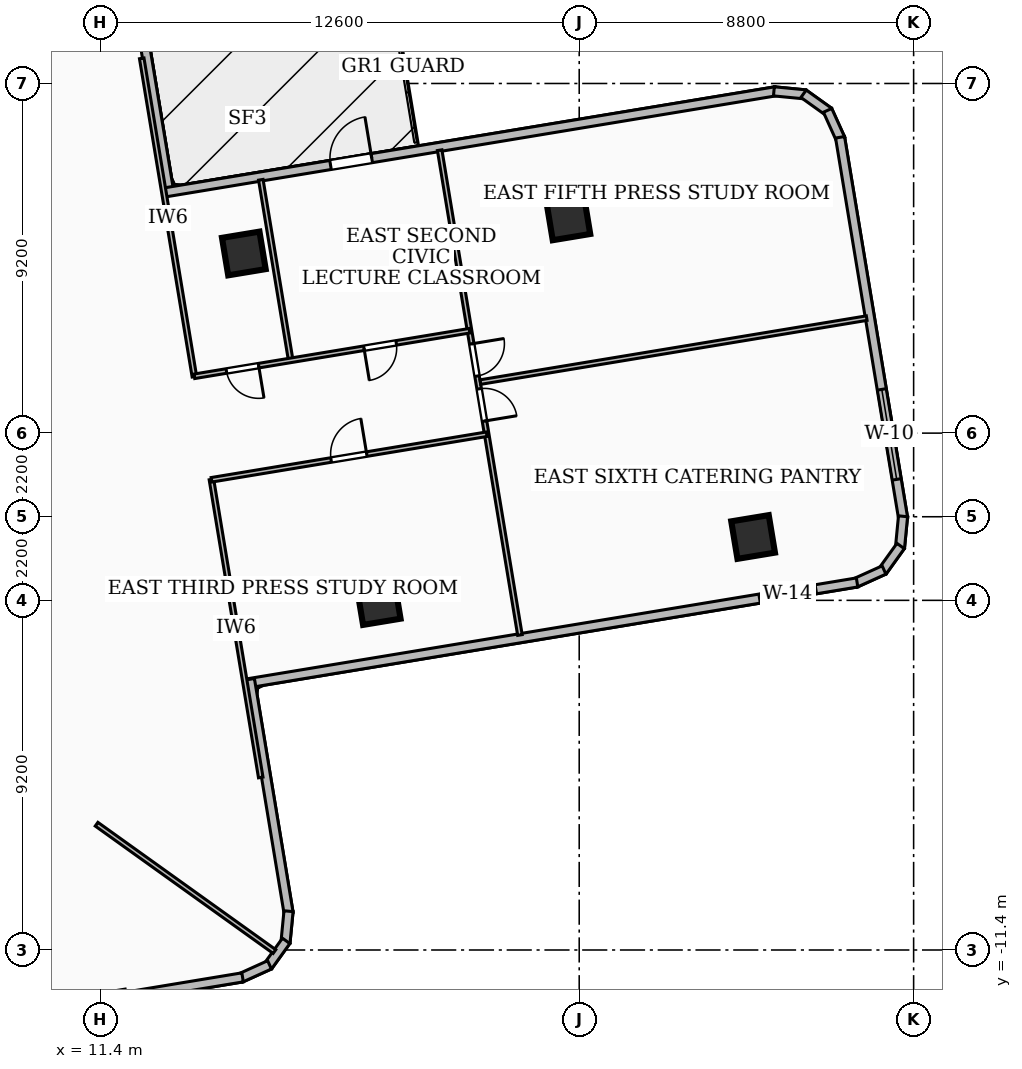
"""IFC4 building model, lengths in metres.
Left out: names, types, materials, properties, quantities, classifications, styles, units other than length and angle.
Written with IfcOpenShell. Run it as: python <this file> out.ifc"""

import sys

from ifc_helpers import new_model, si_unit, direction, frame, frame_2d, origin, origin_2d, place, context, subcontext, project, spatial, rectangle, extrude, element, fill, save


model = new_model("IFC4")
c1 = context("Model", 3, precision=1e-05, world=origin(), true_north=direction((0.0, 1.0)))
c2 = subcontext(c1, "Body", "Model", "MODEL_VIEW")
j1 = project(units=[si_unit("LENGTHUNIT", "METRE"), si_unit("PLANEANGLEUNIT", "RADIAN")], contexts=[c1])
p1 = place(None, origin())
s1 = spatial("IfcSite", under=j1, at=p1, CompositionType="ELEMENT")
p2 = place(p1, origin())
s2 = spatial("IfcBuilding", under=s1, at=p2, CompositionType="ELEMENT")
p3 = place(p2, frame((0.0, 0.0, 92.88)))
s3 = spatial("IfcBuildingStorey", under=s2, at=p3, CompositionType="ELEMENT", Elevation=92.88)
for number, where, z_axis, x_axis in (
    (1, (18.724, -2.271, 0.0), (0.0, 0.0, 1.0), (0.987, 0.163, 0.0)),
    (2, (15.175, 6.927, 0.0), (0.0, 0.0, 1.0), (0.987, 0.163, 0.0)),
    (3, (28.576, -0.533, 0.0), (0.0, 0.0, 1.0), (0.987, 0.163, 0.0)),
    (4, (23.715, 7.851, 0.0), (0.0, 0.0, 1.0), (0.987, 0.163, 0.0)),
):
    element("IfcColumn", number, at=place(p3, frame(where, z_axis=z_axis, x_axis=x_axis)), inside=s3, PredefinedType="COLUMN", context=c2, shape_type="SweptSolid", body=[
        extrude(rectangle(XDim=1.0, YDim=1.0, at=origin_2d()), origin(), (0.0, 0.0, 1.0), 3.6),
    ])
p4 = place(p3, frame((12.12, 15.142, 0.0), z_axis=(0.0, 0.0, 1.0), x_axis=(0.163241835244, -0.986586085056, 0.0)))
e5 = element("IfcWall", 5, at=p4, inside=s3, PredefinedType="SOLIDWALL", context=c2, shape_type="SweptSolid", body=[
    extrude(rectangle(XDim=6.775, YDim=0.24, at=frame_2d((3.387, 0.0))), origin(), (0.0, 0.0, 1.0), 2.644),
])
p5 = place(p3, frame((13.115, 8.537, 0.0), z_axis=(0.0, 0.0, 1.0), x_axis=(0.986576548161, 0.163299463007, 0.0)))
e6 = element("IfcWall", 6, at=p5, inside=s3, PredefinedType="SOLIDWALL", context=c2, shape_type="SweptSolid", body=[
    extrude(rectangle(XDim=16.277, YDim=0.24, at=frame_2d((8.138, 0.0))), origin(), (0.0, 0.0, 1.0), 2.644),
])
p6 = place(p5, frame((4.4, 0.0, 0.0)))
e7 = element("IfcOpeningElement", 7, at=p6, cuts=e6, PredefinedType="OPENING", context=c2, shape_type="SweptSolid", body=[
    extrude(rectangle(XDim=1.1, YDim=2.1, at=frame_2d((0.55, 1.05))), frame((0.0, 0.13, 0.0), z_axis=(0.0, -1.0, 0.0), x_axis=(1.0, 0.0, 0.0)), (0.0, 0.0, 1.0), 0.26),
])
p7 = place(p3, frame((29.123, 11.193, 0.0), z_axis=(0.0, 0.0, 1.0), x_axis=(0.995332708541, -0.096502846113, 0.0)))
e8 = element("IfcWall", 8, at=p7, inside=s3, PredefinedType="SOLIDWALL", context=c2, shape_type="SweptSolid", body=[
    extrude(rectangle(XDim=0.83, YDim=0.24, at=frame_2d((0.415, 0.0))), origin(), (0.0, 0.0, 1.0), 3.34),
])
p8 = place(p3, frame((29.904, 11.13, 0.0), z_axis=(0.0, 0.0, 1.0), x_axis=(0.812516648433, -0.582937986427, 0.0)))
e9 = element("IfcWall", 9, at=p8, inside=s3, PredefinedType="SOLIDWALL", context=c2, shape_type="SweptSolid", body=[
    extrude(rectangle(XDim=0.815, YDim=0.24, at=frame_2d((0.407, 0.0))), origin(), (0.0, 0.0, 1.0), 3.34),
])
p9 = place(p3, frame((30.536, 10.693, 0.0), z_axis=(0.0, 0.0, 1.0), x_axis=(0.411720575173, -0.911310138196, 0.0)))
e10 = element("IfcWall", 10, at=p9, inside=s3, PredefinedType="SOLIDWALL", context=c2, shape_type="SweptSolid", body=[
    extrude(rectangle(XDim=0.831, YDim=0.24, at=frame_2d((0.416, 0.0))), origin(), (0.0, 0.0, 1.0), 3.34),
])
p10 = place(p3, frame((30.864, 9.984, 0.0), z_axis=(0.0, 0.0, 1.0), x_axis=(0.163307635867, -0.986575195344, 0.0)))
e11 = element("IfcWall", 11, at=p10, inside=s3, PredefinedType="SOLIDWALL", context=c2, shape_type="SweptSolid", body=[
    extrude(rectangle(XDim=10.158, YDim=0.24, at=frame_2d((5.079, 0.0))), origin(), (0.0, 0.0, 1.0), 3.34),
])
p11 = place(p10, frame((6.724, 0.0, 0.85)))
e12 = element("IfcOpeningElement", 12, at=p11, cuts=e11, PredefinedType="OPENING", context=c2, shape_type="SweptSolid", body=[
    extrude(rectangle(XDim=2.4, YDim=1.65, at=frame_2d((1.2, 0.825))), frame((0.0, 0.13, 0.0), z_axis=(0.0, -1.0, 0.0), x_axis=(1.0, 0.0, 0.0)), (0.0, 0.0, 1.0), 0.26),
])
p12 = place(p3, frame((32.521, 0.012, 0.0), z_axis=(0.0, 0.0, 1.0), x_axis=(-0.096389937095, -0.995343649212, 0.0)))
e13 = element("IfcWall", 13, at=p12, inside=s3, PredefinedType="SOLIDWALL", context=c2, shape_type="SweptSolid", body=[
    extrude(rectangle(XDim=0.831, YDim=0.24, at=frame_2d((0.416, 0.0))), origin(), (0.0, 0.0, 1.0), 3.34),
])
p13 = place(p3, frame((32.458, -0.77, 0.0), z_axis=(0.0, 0.0, 1.0), x_axis=(-0.583704032354, -0.811966503382, 0.0)))
e14 = element("IfcWall", 14, at=p13, inside=s3, PredefinedType="SOLIDWALL", context=c2, shape_type="SweptSolid", body=[
    extrude(rectangle(XDim=0.814, YDim=0.24, at=frame_2d((0.407, 0.0))), origin(), (0.0, 0.0, 1.0), 3.34),
])
p14 = place(p3, frame((32.021, -1.401, 0.0), z_axis=(0.0, 0.0, 1.0), x_axis=(-0.911310138196, -0.411720575173, 0.0)))
e15 = element("IfcWall", 15, at=p14, inside=s3, PredefinedType="SOLIDWALL", context=c2, shape_type="SweptSolid", body=[
    extrude(rectangle(XDim=0.831, YDim=0.24, at=frame_2d((0.416, 0.0))), origin(), (0.0, 0.0, 1.0), 3.34),
])
p15 = place(p3, frame((31.312, -1.729, 0.0), z_axis=(0.0, 0.0, 1.0), x_axis=(-0.986572947557, -0.163321214629, 0.0)))
e16 = element("IfcWall", 16, at=p15, inside=s3, PredefinedType="SOLIDWALL", context=c2, shape_type="SweptSolid", body=[
    extrude(rectangle(XDim=16.274, YDim=0.24, at=frame_2d((8.137, 0.0))), origin(), (0.0, 0.0, 1.0), 3.34),
])
p16 = place(p15, frame((1.1, 0.0, 0.85)))
e17 = element("IfcOpeningElement", 17, at=p16, cuts=e16, PredefinedType="OPENING", context=c2, shape_type="SweptSolid", body=[
    extrude(rectangle(XDim=1.5, YDim=1.5, at=frame_2d((0.75, 0.75))), frame((0.0, 0.13, 0.0), z_axis=(0.0, -1.0, 0.0), x_axis=(1.0, 0.0, 0.0)), (0.0, 0.0, 1.0), 0.26),
])
p17 = place(p3, frame((15.335, -4.276, 0.0), z_axis=(0.0, 0.0, 1.0), x_axis=(0.16323720082, -0.986586851863, 0.0)))
e18 = element("IfcWall", 18, at=p17, inside=s3, PredefinedType="SOLIDWALL", context=c2, shape_type="SweptSolid", body=[
    extrude(rectangle(XDim=6.237, YDim=0.24, at=frame_2d((3.118, 0.0))), origin(), (0.0, 0.0, 1.0), 3.34),
])
p18 = place(p3, frame((16.351, -10.379, 0.0), z_axis=(0.0, 0.0, 1.0), x_axis=(-0.096474594184, -0.995335447313, 0.0)))
e19 = element("IfcWall", 19, at=p18, inside=s3, PredefinedType="SOLIDWALL", context=c2, shape_type="SweptSolid", body=[
    extrude(rectangle(XDim=0.83, YDim=0.24, at=frame_2d((0.415, 0.0))), origin(), (0.0, 0.0, 1.0), 3.34),
])
p19 = place(p3, frame((16.288, -11.16, 0.0), z_axis=(0.0, 0.0, 1.0), x_axis=(-0.583561896965, -0.812068662375, 0.0)))
e20 = element("IfcWall", 20, at=p19, inside=s3, PredefinedType="SOLIDWALL", context=c2, shape_type="SweptSolid", body=[
    extrude(rectangle(XDim=0.814, YDim=0.24, at=frame_2d((0.407, 0.0))), origin(), (0.0, 0.0, 1.0), 3.34),
])
p20 = place(p3, frame((15.851, -11.791, 0.0), z_axis=(0.0, 0.0, 1.0), x_axis=(-0.910868773958, -0.412696106872, 0.0)))
e21 = element("IfcWall", 21, at=p20, inside=s3, PredefinedType="SOLIDWALL", context=c2, shape_type="SweptSolid", body=[
    extrude(rectangle(XDim=0.831, YDim=0.24, at=frame_2d((0.416, 0.0))), origin(), (0.0, 0.0, 1.0), 3.34),
])
p21 = place(p3, frame((15.142, -12.12, 0.0), z_axis=(0.0, 0.0, 1.0), x_axis=(-0.986586085056, -0.163241835244, 0.0)))
e22 = element("IfcWall", 22, at=p21, inside=s3, PredefinedType="SOLIDWALL", context=c2, shape_type="SweptSolid", body=[
    extrude(rectangle(XDim=6.775, YDim=0.24, at=frame_2d((3.387, 0.0))), origin(), (0.0, 0.0, 1.0), 3.34),
])
p22 = place(p3, frame((7.431, 10.38, 0.0), z_axis=(0.0, 0.0, 1.0), x_axis=(0.582126278944, 0.813098392178, 0.0)))
e23 = element("IfcWall", 23, at=p22, inside=s3, PredefinedType="PARTITIONING", context=c2, shape_type="SweptSolid", body=[
    extrude(rectangle(XDim=6.889, YDim=0.12, at=frame_2d((3.444, 0.0))), origin(), (0.0, 0.0, 1.0), 2.486),
])
p23 = place(p3, frame((11.3, -8.09, 0.0), z_axis=(0.0, 0.0, 1.0), x_axis=(0.813131268368, -0.582080355623, 0.0)))
e24 = element("IfcWall", 24, at=p23, inside=s3, PredefinedType="PARTITIONING", context=c2, shape_type="SweptSolid", body=[
    extrude(rectangle(XDim=5.757, YDim=0.12, at=frame_2d((2.878, 0.0))), origin(), (0.0, 0.0, 1.0), 3.34),
])
p24 = place(p3, frame((13.874, 3.686, 0.0), z_axis=(0.0, 0.0, 1.0), x_axis=(-0.163270245909, 0.98658138377, 0.0)))
e25 = element("IfcWall", 25, at=p24, inside=s3, PredefinedType="PARTITIONING", context=c2, shape_type="SweptSolid", body=[
    extrude(rectangle(XDim=8.489, YDim=0.12, at=frame_2d((4.245, 0.0))), origin(), (0.0, 0.0, 1.0), 2.486),
])
p25 = place(p3, frame((15.62, -6.86, 0.0), z_axis=(0.0, 0.0, 1.0), x_axis=(-0.16330811288, 0.986575116384, 0.0)))
e26 = element("IfcWall", 26, at=p25, inside=s3, PredefinedType="PARTITIONING", context=c2, shape_type="SweptSolid", body=[
    extrude(rectangle(XDim=7.949, YDim=0.12, at=frame_2d((3.974, 0.0))), origin(), (0.0, 0.0, 1.0), 2.486),
])
p26 = place(p3, frame((16.405, 4.135, 0.0), z_axis=(0.0, 0.0, 1.0), x_axis=(-0.163276056047, 0.986580422227, 0.0)))
e27 = element("IfcWall", 27, at=p26, inside=s3, PredefinedType="PARTITIONING", context=c2, shape_type="SweptSolid", body=[
    extrude(rectangle(XDim=4.795, YDim=0.12, at=frame_2d((2.398, 0.0))), origin(), (0.0, 0.0, 1.0), 2.486),
])
p27 = place(p3, frame((21.114, 4.894, 0.0), z_axis=(0.0, 0.0, 1.0), x_axis=(-0.986566884893, -0.163357833093, 0.0)))
e28 = element("IfcWall", 28, at=p27, inside=s3, PredefinedType="PARTITIONING", context=c2, shape_type="SweptSolid", body=[
    extrude(rectangle(XDim=7.34, YDim=0.12, at=frame_2d((3.67, 0.0))), origin(), (0.0, 0.0, 1.0), 3.34),
])
p28 = place(p27, frame((5.625, 0.0, 0.0)))
e29 = element("IfcOpeningElement", 29, at=p28, cuts=e28, PredefinedType="OPENING", context=c2, shape_type="SweptSolid", body=[
    extrude(rectangle(XDim=0.86, YDim=2.04, at=frame_2d((0.43, 1.02))), frame((0.0, 0.07, 0.0), z_axis=(0.0, -1.0, 0.0), x_axis=(1.0, 0.0, 0.0)), (0.0, 0.0, 1.0), 0.14),
])
p29 = place(p27, frame((1.955, 0.0, 0.0)))
e30 = element("IfcOpeningElement", 30, at=p29, cuts=e28, PredefinedType="OPENING", context=c2, shape_type="SweptSolid", body=[
    extrude(rectangle(XDim=0.86, YDim=2.04, at=frame_2d((0.43, 1.02))), frame((0.0, 0.07, 0.0), z_axis=(0.0, -1.0, 0.0), x_axis=(1.0, 0.0, 0.0)), (0.0, 0.0, 1.0), 0.14),
])
p30 = place(p3, frame((14.324, 0.972, 0.0), z_axis=(0.0, 0.0, 1.0), x_axis=(0.986566884893, 0.163357833093, 0.0)))
e31 = element("IfcWall", 31, at=p30, inside=s3, PredefinedType="PARTITIONING", context=c2, shape_type="SweptSolid", body=[
    extrude(rectangle(XDim=7.34, YDim=0.12, at=frame_2d((3.67, 0.0))), origin(), (0.0, 0.0, 1.0), 3.34),
])
p31 = place(p30, frame((3.19, 0.0, 0.0)))
e32 = element("IfcOpeningElement", 32, at=p31, cuts=e31, PredefinedType="OPENING", context=c2, shape_type="SweptSolid", body=[
    extrude(rectangle(XDim=0.95, YDim=2.08, at=frame_2d((0.475, 1.04))), frame((0.0, 0.07, 0.0), z_axis=(0.0, -1.0, 0.0), x_axis=(1.0, 0.0, 0.0)), (0.0, 0.0, 1.0), 0.14),
])
p32 = place(p3, frame((21.399, 3.543, 0.0), z_axis=(0.0, 0.0, 1.0), x_axis=(0.986570089658, 0.16333847738, 0.0)))
e33 = element("IfcWall", 33, at=p32, inside=s3, PredefinedType="PARTITIONING", context=c2, shape_type="SweptSolid", body=[
    extrude(rectangle(XDim=10.304, YDim=0.12, at=frame_2d((5.152, 0.0))), origin(), (0.0, 0.0, 1.0), 2.832),
])
p33 = place(p3, frame((20.328, 9.645, 0.0), z_axis=(0.0, 0.0, 1.0), x_axis=(0.163336472865, -0.986570421527, 0.0)))
e34 = element("IfcWall", 34, at=p33, inside=s3, PredefinedType="PARTITIONING", context=c2, shape_type="SweptSolid", body=[
    extrude(rectangle(XDim=12.931, YDim=0.12, at=frame_2d((6.465, 0.0))), origin(), (0.0, 0.0, 1.0), 2.486),
])
p34 = place(p33, frame((6.365, 0.0, 0.0)))
e35 = element("IfcOpeningElement", 35, at=p34, cuts=e34, PredefinedType="OPENING", context=c2, shape_type="SweptSolid", body=[
    extrude(rectangle(XDim=0.86, YDim=2.04, at=frame_2d((0.43, 1.02))), frame((0.0, 0.07, 0.0), z_axis=(0.0, -1.0, 0.0), x_axis=(1.0, 0.0, 0.0)), (0.0, 0.0, 1.0), 0.14),
])
p35 = place(p33, frame((5.165, 0.0, 0.0)))
e36 = element("IfcOpeningElement", 36, at=p35, cuts=e34, PredefinedType="OPENING", context=c2, shape_type="SweptSolid", body=[
    extrude(rectangle(XDim=0.86, YDim=2.04, at=frame_2d((0.43, 1.02))), frame((0.0, 0.07, 0.0), z_axis=(0.0, -1.0, 0.0), x_axis=(1.0, 0.0, 0.0)), (0.0, 0.0, 1.0), 0.14),
])
p36 = place(p6, origin())
e37 = element("IfcDoor", 37, at=p36, inside=s3, OperationType="SINGLE_SWING_RIGHT", PredefinedType="DOOR", context=c2, shape_type="SweptSolid", body=[
    extrude(rectangle(XDim=1.1, YDim=2.1, at=frame_2d((0.55, 1.05))), frame((0.0, 0.025, 0.0), z_axis=(0.0, -1.0, 0.0), x_axis=(1.0, 0.0, 0.0)), (0.0, 0.0, 1.0), 0.05),
])
fill(e7, e37)
p37 = place(p11, origin())
e38 = element("IfcWindow", 38, at=p37, inside=s3, PartitioningType="SINGLE_PANEL", PredefinedType="WINDOW", context=c2, shape_type="SweptSolid", body=[
    extrude(rectangle(XDim=2.4, YDim=1.65, at=frame_2d((1.2, 0.825))), frame((0.0, 0.03, 0.0), z_axis=(0.0, -1.0, 0.0), x_axis=(1.0, 0.0, 0.0)), (0.0, 0.0, 1.0), 0.06),
])
fill(e12, e38)
p38 = place(p16, origin())
e39 = element("IfcWindow", 39, at=p38, inside=s3, PartitioningType="SINGLE_PANEL", PredefinedType="WINDOW", context=c2, shape_type="SweptSolid", body=[
    extrude(rectangle(XDim=1.5, YDim=1.5, at=frame_2d((0.75, 0.75))), frame((0.0, 0.03, 0.0), z_axis=(0.0, -1.0, 0.0), x_axis=(1.0, 0.0, 0.0)), (0.0, 0.0, 1.0), 0.06),
])
fill(e17, e39)
p39 = place(p28, origin())
e40 = element("IfcDoor", 40, at=p39, inside=s3, OperationType="SINGLE_SWING_LEFT", PredefinedType="DOOR", context=c2, shape_type="SweptSolid", body=[
    extrude(rectangle(XDim=0.86, YDim=2.04, at=frame_2d((0.43, 1.02))), frame((0.0, 0.025, 0.0), z_axis=(0.0, -1.0, 0.0), x_axis=(1.0, 0.0, 0.0)), (0.0, 0.0, 1.0), 0.05),
])
fill(e29, e40)
p40 = place(p29, origin())
e41 = element("IfcDoor", 41, at=p40, inside=s3, OperationType="SINGLE_SWING_RIGHT", PredefinedType="DOOR", context=c2, shape_type="SweptSolid", body=[
    extrude(rectangle(XDim=0.86, YDim=2.04, at=frame_2d((0.43, 1.02))), frame((0.0, 0.025, 0.0), z_axis=(0.0, -1.0, 0.0), x_axis=(1.0, 0.0, 0.0)), (0.0, 0.0, 1.0), 0.05),
])
fill(e30, e41)
p41 = place(p31, origin())
e42 = element("IfcDoor", 42, at=p41, inside=s3, OperationType="SINGLE_SWING_RIGHT", PredefinedType="DOOR", context=c2, shape_type="SweptSolid", body=[
    extrude(rectangle(XDim=0.95, YDim=2.08, at=frame_2d((0.475, 1.04))), frame((0.0, 0.025, 0.0), z_axis=(0.0, -1.0, 0.0), x_axis=(1.0, 0.0, 0.0)), (0.0, 0.0, 1.0), 0.05),
])
fill(e32, e42)
p42 = place(p34, origin())
e43 = element("IfcDoor", 43, at=p42, inside=s3, OperationType="SINGLE_SWING_RIGHT", PredefinedType="DOOR", context=c2, shape_type="SweptSolid", body=[
    extrude(rectangle(XDim=0.86, YDim=2.04, at=frame_2d((0.43, 1.02))), frame((0.0, 0.025, 0.0), z_axis=(0.0, -1.0, 0.0), x_axis=(1.0, 0.0, 0.0)), (0.0, 0.0, 1.0), 0.05),
])
fill(e35, e43)
p43 = place(p35, origin())
e44 = element("IfcDoor", 44, at=p43, inside=s3, OperationType="SINGLE_SWING_LEFT", PredefinedType="DOOR", context=c2, shape_type="SweptSolid", body=[
    extrude(rectangle(XDim=0.86, YDim=2.04, at=frame_2d((0.43, 1.02))), frame((0.0, 0.025, 0.0), z_axis=(0.0, -1.0, 0.0), x_axis=(1.0, 0.0, 0.0)), (0.0, 0.0, 1.0), 0.05),
])
fill(e36, e44)
save(model, sys.argv[1])
